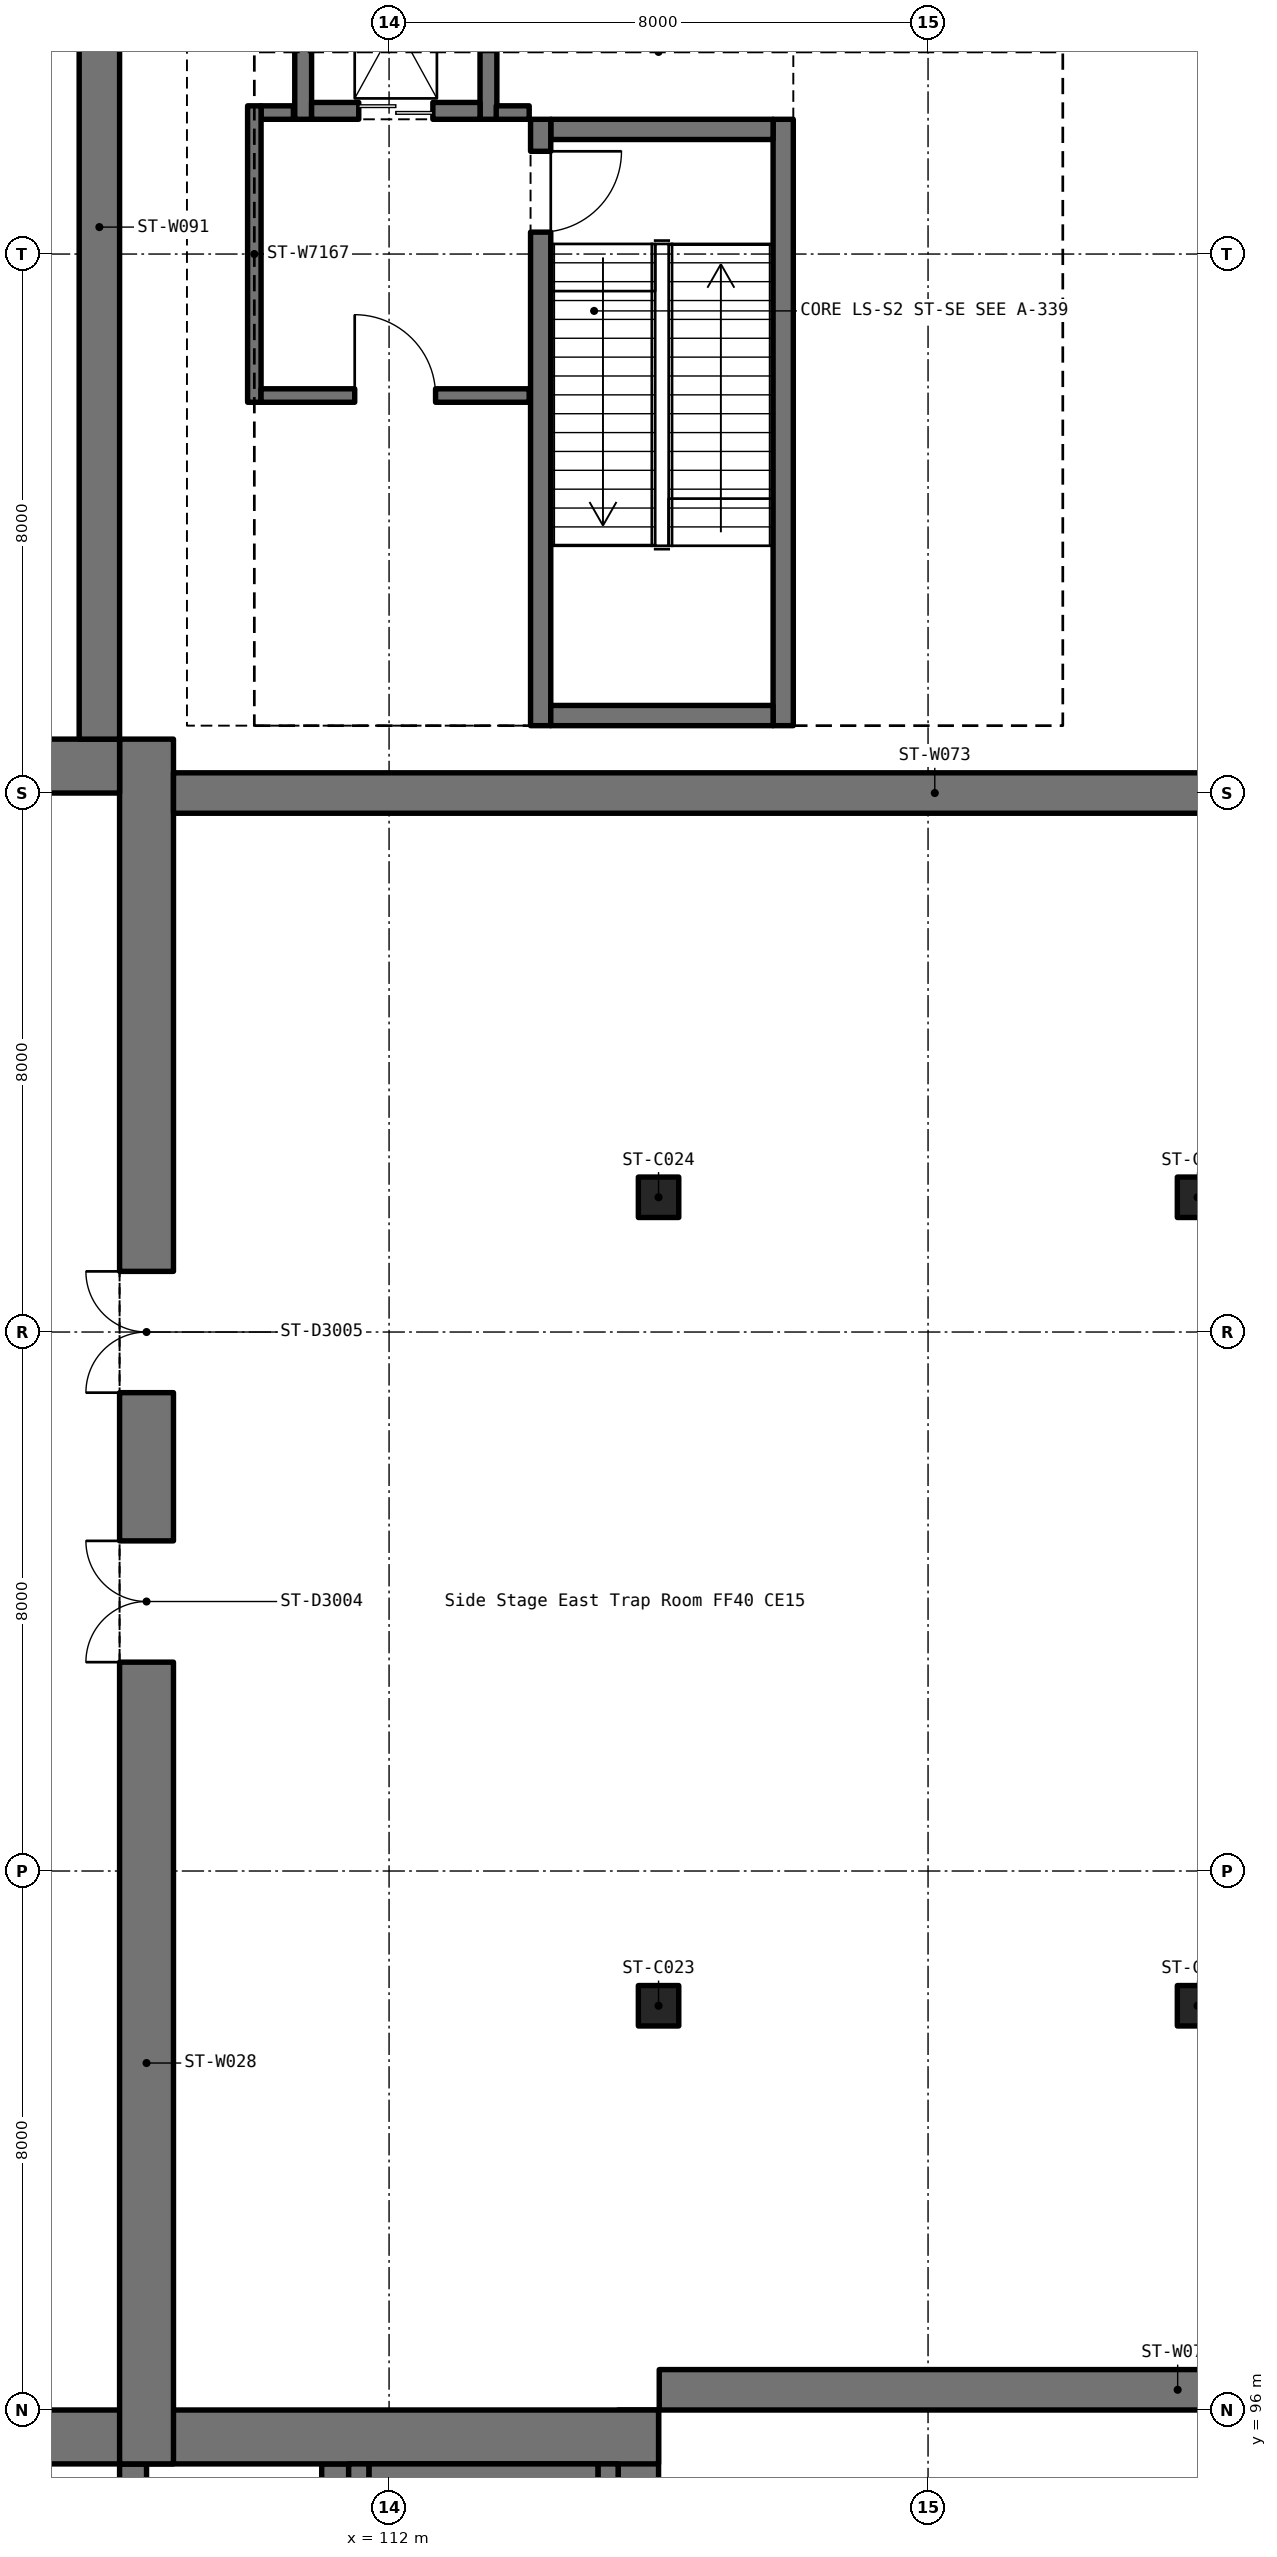
"""IFC4 building model, lengths in metres.
Left out: names, types, materials, properties, quantities, classifications, styles, units other than length and angle.
Written with IfcOpenShell. Run it as: python <this file> out.ifc"""

import sys

from ifc_helpers import new_model, si_unit, direction, frame, frame_2d, origin, origin_2d, place, context, subcontext, project, spatial, rectangle, extrude, element, fill, save


model = new_model("IFC4")
c1 = context("Model", 3, precision=1e-05, world=origin(), true_north=direction((0.0, 1.0)))
c2 = subcontext(c1, "Body", "Model", "MODEL_VIEW")
j1 = project(units=[si_unit("LENGTHUNIT", "METRE"), si_unit("PLANEANGLEUNIT", "RADIAN")], contexts=[c1])
p1 = place(None, origin())
s1 = spatial("IfcSite", under=j1, at=p1, CompositionType="ELEMENT")
p2 = place(p1, origin())
s2 = spatial("IfcBuilding", under=s1, at=p2, CompositionType="ELEMENT")
p3 = place(p2, frame((0.0, 0.0, -6.0)))
s3 = spatial("IfcBuildingStorey", under=s2, at=p3, CompositionType="ELEMENT", Elevation=-6.0)
p4 = place(p3, frame((115.7, 64.0, -0.3), z_axis=(0.0, 0.0, 1.0), x_axis=(0.0, 1.0, 0.0)))
e1 = element("IfcWall", 1, at=p4, inside=s3, PredefinedType="SHEAR", context=c2, shape_type="SweptSolid", body=[
    extrude(rectangle(XDim=32.0, YDim=0.6, at=frame_2d((16.0, 0.0))), origin(), (0.0, 0.0, 1.0), 6.3),
])
p5 = place(p3, frame((111.2, 83.987, -0.3), z_axis=(0.0, 0.0, 1.0), x_axis=(0.0, 1.0, 0.0)))
e2 = element("IfcWall", 2, at=p5, inside=s3, PredefinedType="SHEAR", context=c2, shape_type="SweptSolid", body=[
    extrude(rectangle(XDim=11.213, YDim=0.4, at=frame_2d((5.606, 0.0))), origin(), (0.0, 0.0, 1.0), 6.3),
])
p6 = place(p3, frame((108.2, 87.8, 0.0), z_axis=(0.0, 0.0, 1.0), x_axis=(0.0, 1.0, 0.0)))
e3 = element("IfcWall", 3, at=p6, inside=s3, PredefinedType="SHEAR", context=c2, shape_type="SweptSolid", body=[
    extrude(rectangle(XDim=7.4, YDim=0.4, at=frame_2d((3.7, 0.0))), origin(), (0.0, 0.0, 1.0), 4.2),
])
p7 = place(p3, frame((76.0, 95.6, 0.0), z_axis=(0.0, 0.0, 1.0), x_axis=(1.0, 0.0, 0.0)))
e4 = element("IfcWall", 4, at=p7, inside=s3, PredefinedType="SHEAR", context=c2, shape_type="SweptSolid", body=[
    extrude(rectangle(XDim=40.0, YDim=0.8, at=frame_2d((20.0, 0.0))), origin(), (0.0, 0.0, 1.0), 6.0),
])
p8 = place(p3, frame((108.4, 95.2, 0.0), z_axis=(0.0, 0.0, 1.0), x_axis=(0.0, 1.0, 0.0)))
e5 = element("IfcWall", 5, at=p8, inside=s3, PredefinedType="SHEAR", context=c2, shape_type="SweptSolid", body=[
    extrude(rectangle(XDim=25.6, YDim=0.8, at=frame_2d((12.8, 0.0))), origin(), (0.0, 0.0, 1.0), 6.0),
])
p9 = place(p8, frame((11.9, 0.0, 0.0)))
e6 = element("IfcOpeningElement", 6, at=p9, cuts=e5, PredefinedType="OPENING", context=c2, shape_type="SweptSolid", body=[
    extrude(rectangle(XDim=1.8, YDim=2.1, at=frame_2d((0.9, 1.05))), frame((0.0, 0.412, 0.0), z_axis=(0.0, -1.0, 0.0), x_axis=(1.0, 0.0, 0.0)), (0.0, 0.0, 1.0), 0.824),
])
p10 = place(p8, frame((15.9, 0.0, 0.0)))
e7 = element("IfcOpeningElement", 7, at=p10, cuts=e5, PredefinedType="OPENING", context=c2, shape_type="SweptSolid", body=[
    extrude(rectangle(XDim=1.8, YDim=2.1, at=frame_2d((0.9, 1.05))), frame((0.0, 0.412, 0.0), z_axis=(0.0, -1.0, 0.0), x_axis=(1.0, 0.0, 0.0)), (0.0, 0.0, 1.0), 0.824),
])
p11 = place(p3, frame((84.0, 120.4, 0.0), z_axis=(0.0, 0.0, 1.0), x_axis=(1.0, 0.0, 0.0)))
e8 = element("IfcWall", 8, at=p11, inside=s3, PredefinedType="SHEAR", context=c2, shape_type="SweptSolid", body=[
    extrude(rectangle(XDim=24.0, YDim=0.8, at=frame_2d((12.0, 0.0))), origin(), (0.0, 0.0, 1.0), 6.0),
])
p12 = place(p3, frame((108.8, 120.0, -0.3), z_axis=(0.0, 0.0, 1.0), x_axis=(1.0, 0.0, 0.0)))
e9 = element("IfcWall", 9, at=p12, inside=s3, PredefinedType="SHEAR", context=c2, shape_type="SweptSolid", body=[
    extrude(rectangle(XDim=22.6, YDim=0.6, at=frame_2d((11.3, 0.0))), origin(), (0.0, 0.0, 1.0), 6.3),
])
p13 = place(p3, frame((116.01, 96.3, -0.3), z_axis=(0.0, 0.0, 1.0), x_axis=(1.0, 0.0, 0.0)))
e10 = element("IfcWall", 10, at=p13, inside=s3, PredefinedType="SHEAR", context=c2, shape_type="SweptSolid", body=[
    extrude(rectangle(XDim=15.39, YDim=0.6, at=frame_2d((7.695, 0.0))), origin(), (0.0, 0.0, 1.0), 6.3),
])
p14 = place(p3, frame((107.7, 120.8, -0.3), z_axis=(0.0, 0.0, 1.0), x_axis=(0.0, 1.0, 0.0)))
e11 = element("IfcWall", 11, at=p14, inside=s3, PredefinedType="SHEAR", context=c2, shape_type="SweptSolid", body=[
    extrude(rectangle(XDim=15.2, YDim=0.6, at=frame_2d((7.6, 0.0))), origin(), (0.0, 0.0, 1.0), 6.3),
])
for number, where, z_axis, x_axis in (
    (12, (116.0, 102.0, 0.0), (0.0, 0.0, 1.0), (1.0, 0.0, 0.0)),
    (13, (116.0, 114.0, 0.0), (0.0, 0.0, 1.0), (1.0, 0.0, 0.0)),
    (14, (124.0, 102.0, 0.0), (0.0, 0.0, 1.0), (1.0, 0.0, 0.0)),
    (15, (124.0, 114.0, 0.0), (0.0, 0.0, 1.0), (1.0, 0.0, 0.0)),
):
    element("IfcColumn", number, at=place(p3, frame(where, z_axis=z_axis, x_axis=x_axis)), inside=s3, PredefinedType="COLUMN", context=c2, shape_type="SweptSolid", body=[
        extrude(rectangle(XDim=0.6, YDim=0.6, at=origin_2d()), origin(), (0.0, 0.0, 1.0), 6.0),
    ])
p15 = place(p3, frame((117.85, 121.0, 0.0), z_axis=(0.0, 0.0, 1.0), x_axis=(0.0, 1.0, 0.0)))
e16 = element("IfcWall", 16, at=p15, inside=s3, PredefinedType="SOLIDWALL", context=c2, shape_type="SweptSolid", body=[
    extrude(rectangle(XDim=9.0, YDim=0.3, at=frame_2d((4.5, 0.0))), origin(), (0.0, 0.0, 1.0), 6.0),
])
p16 = place(p3, frame((117.7, 129.85, 0.0), z_axis=(0.0, 0.0, 1.0), x_axis=(-1.0, 0.0, 0.0)))
e17 = element("IfcWall", 17, at=p16, inside=s3, PredefinedType="SOLIDWALL", context=c2, shape_type="SweptSolid", body=[
    extrude(rectangle(XDim=3.3, YDim=0.3, at=frame_2d((1.65, 0.0))), origin(), (0.0, 0.0, 1.0), 6.0),
])
p17 = place(p3, frame((114.25, 130.0, 0.0), z_axis=(0.0, 0.0, 1.0), x_axis=(0.0, -1.0, 0.0)))
e18 = element("IfcWall", 18, at=p17, inside=s3, PredefinedType="SOLIDWALL", context=c2, shape_type="SweptSolid", body=[
    extrude(rectangle(XDim=9.0, YDim=0.3, at=frame_2d((4.5, 0.0))), origin(), (0.0, 0.0, 1.0), 6.0),
])
p18 = place(p17, frame((0.475, 0.0, 0.0)))
e19 = element("IfcOpeningElement", 19, at=p18, cuts=e18, PredefinedType="OPENING", context=c2, shape_type="SweptSolid", body=[
    extrude(rectangle(XDim=1.2, YDim=2.1, at=frame_2d((0.6, 1.05))), frame((0.0, 0.162, 0.0), z_axis=(0.0, -1.0, 0.0), x_axis=(1.0, 0.0, 0.0)), (0.0, 0.0, 1.0), 0.324),
])
p19 = place(p3, frame((114.4, 121.15, 0.0), z_axis=(0.0, 0.0, 1.0), x_axis=(1.0, 0.0, 0.0)))
e20 = element("IfcWall", 20, at=p19, inside=s3, PredefinedType="SOLIDWALL", context=c2, shape_type="SweptSolid", body=[
    extrude(rectangle(XDim=3.3, YDim=0.3, at=frame_2d((1.65, 0.0))), origin(), (0.0, 0.0, 1.0), 6.0),
])
p20 = place(p3, frame((115.25, 85.0, 0.0), z_axis=(0.0, 0.0, 1.0), x_axis=(0.0, 1.0, 0.0)))
e21 = element("IfcWall", 21, at=p20, inside=s3, PredefinedType="SOLIDWALL", context=c2, shape_type="SweptSolid", body=[
    extrude(rectangle(XDim=10.2, YDim=0.3, at=frame_2d((5.1, 0.0))), origin(), (0.0, 0.0, 1.0), 6.0),
])
p21 = place(p3, frame((115.1, 95.05, 0.0), z_axis=(0.0, 0.0, 1.0), x_axis=(-1.0, 0.0, 0.0)))
e22 = element("IfcWall", 22, at=p21, inside=s3, PredefinedType="SOLIDWALL", context=c2, shape_type="SweptSolid", body=[
    extrude(rectangle(XDim=3.4, YDim=0.3, at=frame_2d((1.7, 0.0))), origin(), (0.0, 0.0, 1.0), 6.0),
])
p22 = place(p3, frame((111.55, 95.2, 0.0), z_axis=(0.0, 0.0, 1.0), x_axis=(0.0, -1.0, 0.0)))
e23 = element("IfcWall", 23, at=p22, inside=s3, PredefinedType="SOLIDWALL", context=c2, shape_type="SweptSolid", body=[
    extrude(rectangle(XDim=10.2, YDim=0.3, at=frame_2d((5.1, 0.0))), origin(), (0.0, 0.0, 1.0), 6.0),
])
for number, where, z_axis, x_axis in (
    (24, (113.475, 130.0, 0.0), (0.0, 0.0, 1.0), (0.0, 1.0, 0.0)),
    (25, (110.725, 134.0, 0.0), (0.0, 0.0, 1.0), (0.0, -1.0, 0.0)),
):
    element("IfcWall", number, at=place(p3, frame(where, z_axis=z_axis, x_axis=x_axis)), inside=s3, PredefinedType="SOLIDWALL", context=c2, shape_type="SweptSolid", body=[
        extrude(rectangle(XDim=4.0, YDim=0.25, at=frame_2d((2.0, 0.0))), origin(), (0.0, 0.0, 1.0), 6.0),
    ])
p23 = place(p3, frame((110.85, 130.125, 0.0), z_axis=(0.0, 0.0, 1.0), x_axis=(1.0, 0.0, 0.0)))
e26 = element("IfcWall", 26, at=p23, inside=s3, PredefinedType="SOLIDWALL", context=c2, shape_type="SweptSolid", body=[
    extrude(rectangle(XDim=2.5, YDim=0.25, at=frame_2d((1.25, 0.0))), origin(), (0.0, 0.0, 1.0), 6.0),
])
p24 = place(p23, frame((0.7, 0.0, 0.0)))
e27 = element("IfcOpeningElement", 27, at=p24, cuts=e26, PredefinedType="OPENING", context=c2, shape_type="SweptSolid", body=[
    extrude(rectangle(XDim=1.1, YDim=2.1, at=frame_2d((0.55, 1.05))), frame((0.0, 0.137, 0.0), z_axis=(0.0, -1.0, 0.0), x_axis=(1.0, 0.0, 0.0)), (0.0, 0.0, 1.0), 0.274),
])
p25 = place(p3, frame((114.08, 130.1, 0.0), z_axis=(0.0, 0.0, 1.0), x_axis=(-1.0, 0.0, 0.0)))
e28 = element("IfcWall", 28, at=p25, inside=s3, PredefinedType="PARTITIONING", context=c2, shape_type="SweptSolid", body=[
    extrude(rectangle(XDim=0.49, YDim=0.2, at=frame_2d((0.245, 0.0))), origin(), (0.0, 0.0, 1.0), 5.7),
])
p26 = place(p3, frame((110.58, 130.1, 0.0), z_axis=(0.0, 0.0, 1.0), x_axis=(-1.0, 0.0, 0.0)))
e29 = element("IfcWall", 29, at=p26, inside=s3, PredefinedType="PARTITIONING", context=c2, shape_type="SweptSolid", body=[
    extrude(rectangle(XDim=0.48, YDim=0.2, at=frame_2d((0.24, 0.0))), origin(), (0.0, 0.0, 1.0), 5.7),
])
p27 = place(p3, frame((110.0, 130.2, 0.0), z_axis=(0.0, 0.0, 1.0), x_axis=(0.0, -1.0, 0.0)))
e30 = element("IfcWall", 30, at=p27, inside=s3, PredefinedType="PARTITIONING", context=c2, shape_type="SweptSolid", body=[
    extrude(rectangle(XDim=4.4, YDim=0.2, at=frame_2d((2.2, 0.0))), origin(), (0.0, 0.0, 1.0), 5.7),
])
p28 = place(p3, frame((110.1, 125.9, 0.0), z_axis=(0.0, 0.0, 1.0), x_axis=(1.0, 0.0, 0.0)))
e31 = element("IfcWall", 31, at=p28, inside=s3, PredefinedType="PARTITIONING", context=c2, shape_type="SweptSolid", body=[
    extrude(rectangle(XDim=3.98, YDim=0.2, at=frame_2d((1.99, 0.0))), origin(), (0.0, 0.0, 1.0), 5.7),
])
p29 = place(p28, frame((1.39, 0.0, 0.0)))
e32 = element("IfcOpeningElement", 32, at=p29, cuts=e31, PredefinedType="OPENING", context=c2, shape_type="SweptSolid", body=[
    extrude(rectangle(XDim=1.2, YDim=2.1, at=frame_2d((0.6, 1.05))), frame((0.0, 0.112, 0.0), z_axis=(0.0, -1.0, 0.0), x_axis=(1.0, 0.0, 0.0)), (0.0, 0.0, 1.0), 0.224),
])
p30 = place(p18, origin())
e33 = element("IfcDoor", 33, at=p30, inside=s3, OperationType="SINGLE_SWING_LEFT", PredefinedType="DOOR", context=c2, shape_type="SweptSolid", body=[
    extrude(rectangle(XDim=1.2, YDim=2.1, at=frame_2d((0.6, 1.05))), frame((0.0, 0.025, 0.0), z_axis=(0.0, -1.0, 0.0), x_axis=(1.0, 0.0, 0.0)), (0.0, 0.0, 1.0), 0.05),
])
fill(e19, e33)
p31 = place(p24, origin())
e34 = element("IfcDoor", 34, at=p31, inside=s3, OperationType="DOUBLE_DOOR_SLIDING", PredefinedType="DOOR", context=c2, shape_type="SweptSolid", body=[
    extrude(rectangle(XDim=1.1, YDim=2.1, at=frame_2d((0.55, 1.05))), frame((0.0, 0.025, 0.0), z_axis=(0.0, -1.0, 0.0), x_axis=(1.0, 0.0, 0.0)), (0.0, 0.0, 1.0), 0.05),
])
fill(e27, e34)
p32 = place(p29, origin())
e35 = element("IfcDoor", 35, at=p32, inside=s3, OperationType="SINGLE_SWING_LEFT", PredefinedType="DOOR", context=c2, shape_type="SweptSolid", body=[
    extrude(rectangle(XDim=1.2, YDim=2.1, at=frame_2d((0.6, 1.05))), frame((0.0, 0.025, 0.0), z_axis=(0.0, -1.0, 0.0), x_axis=(1.0, 0.0, 0.0)), (0.0, 0.0, 1.0), 0.05),
])
fill(e32, e35)
p33 = place(p9, origin())
e36 = element("IfcDoor", 36, at=p33, inside=s3, OperationType="DOUBLE_DOOR_SINGLE_SWING", PredefinedType="DOOR", context=c2, shape_type="SweptSolid", body=[
    extrude(rectangle(XDim=1.8, YDim=2.1, at=frame_2d((0.9, 1.05))), frame((0.0, 0.025, 0.0), z_axis=(0.0, -1.0, 0.0), x_axis=(1.0, 0.0, 0.0)), (0.0, 0.0, 1.0), 0.05),
])
fill(e6, e36)
p34 = place(p10, origin())
e37 = element("IfcDoor", 37, at=p34, inside=s3, OperationType="DOUBLE_DOOR_SINGLE_SWING", PredefinedType="DOOR", context=c2, shape_type="SweptSolid", body=[
    extrude(rectangle(XDim=1.8, YDim=2.1, at=frame_2d((0.9, 1.05))), frame((0.0, 0.025, 0.0), z_axis=(0.0, -1.0, 0.0), x_axis=(1.0, 0.0, 0.0)), (0.0, 0.0, 1.0), 0.05),
])
fill(e7, e37)
save(model, sys.argv[1])
